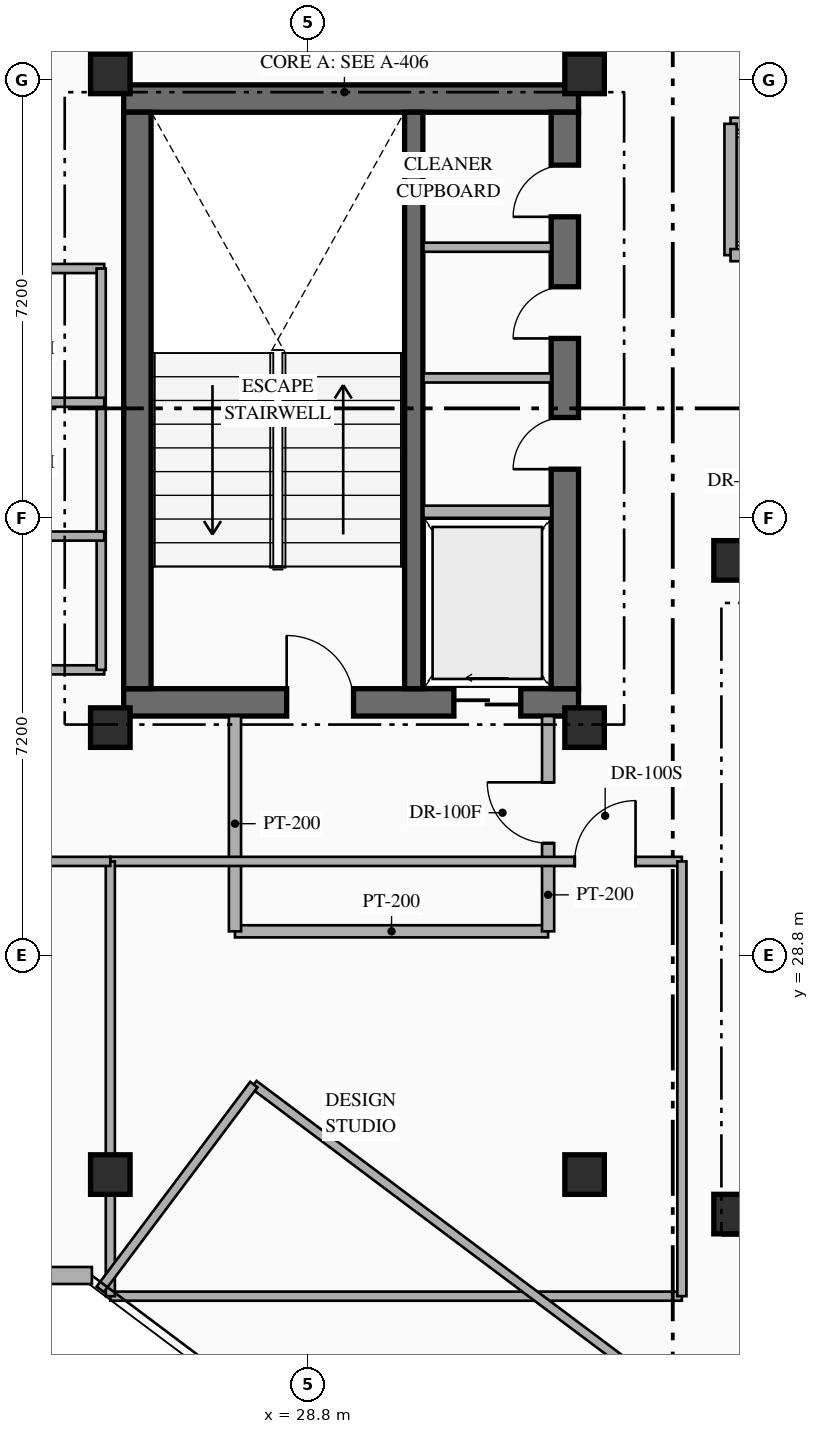
"""IFC4 building model, lengths in metres.
Left out: names, types, materials, properties, quantities, classifications, styles, units other than length and angle.
Written with IfcOpenShell. Run it as: python <this file> out.ifc"""

import sys

from ifc_helpers import new_model, si_unit, direction, frame, frame_2d, origin, origin_2d, place, context, subcontext, project, spatial, rectangle, hollow_rectangle, extrude, element, fill, save


model = new_model("IFC4")
c1 = context("Model", 3, precision=1e-05, world=origin(), true_north=direction((0.0, 1.0)))
c2 = subcontext(c1, "Body", "Model", "MODEL_VIEW")
j1 = project(units=[si_unit("LENGTHUNIT", "METRE"), si_unit("PLANEANGLEUNIT", "RADIAN")], contexts=[c1])
p1 = place(None, origin())
s1 = spatial("IfcSite", under=j1, at=p1, CompositionType="ELEMENT")
p2 = place(p1, origin())
s2 = spatial("IfcBuilding", under=s1, at=p2, CompositionType="ELEMENT")
p3 = place(p2, frame((0.0, 0.0, 239.55)))
s3 = spatial("IfcBuildingStorey", under=s2, at=p3, CompositionType="ELEMENT", Elevation=239.55)
p4 = place(p3, frame((25.77, 32.965, 0.0), z_axis=(0.0, 0.0, 1.0), x_axis=(1.0, 0.0, 0.0)))
e1 = element("IfcWall", 1, at=p4, inside=s3, PredefinedType="SHEAR", context=c2, shape_type="SweptSolid", body=[
    extrude(rectangle(XDim=7.48, YDim=0.45, at=frame_2d((3.74, 0.0))), origin(), (0.0, 0.0, 1.0), 3.6),
])
p5 = place(p4, frame((2.68, 0.0, 0.0)))
e2 = element("IfcOpeningElement", 2, at=p5, cuts=e1, PredefinedType="OPENING", context=c2, shape_type="SweptSolid", body=[
    extrude(rectangle(XDim=1.1, YDim=2.2, at=frame_2d((0.55, 1.1))), frame((0.0, 0.235, 0.0), z_axis=(0.0, -1.0, 0.0), x_axis=(1.0, 0.0, 0.0)), (0.0, 0.0, 1.0), 0.47),
])
p6 = place(p4, frame((5.43, 0.0, 0.0)))
e3 = element("IfcOpeningElement", 3, at=p6, cuts=e1, PredefinedType="OPENING", context=c2, shape_type="SweptSolid", body=[
    extrude(rectangle(XDim=1.1, YDim=2.15, at=frame_2d((0.55, 1.075))), frame((0.0, 0.235, 0.0), z_axis=(0.0, -1.0, 0.0), x_axis=(1.0, 0.0, 0.0)), (0.0, 0.0, 1.0), 0.47),
])
p7 = place(p3, frame((25.77, 42.895, 0.0), z_axis=(0.0, 0.0, 1.0), x_axis=(1.0, 0.0, 0.0)))
e4 = element("IfcWall", 4, at=p7, inside=s3, PredefinedType="SHEAR", context=c2, shape_type="SweptSolid", body=[
    extrude(rectangle(XDim=7.48, YDim=0.45, at=frame_2d((3.74, 0.0))), origin(), (0.0, 0.0, 1.0), 3.6),
])
p8 = place(p3, frame((25.995, 33.19, 0.0), z_axis=(0.0, 0.0, 1.0), x_axis=(0.0, 1.0, 0.0)))
e5 = element("IfcWall", 5, at=p8, inside=s3, PredefinedType="SHEAR", context=c2, shape_type="SweptSolid", body=[
    extrude(rectangle(XDim=9.48, YDim=0.45, at=frame_2d((4.74, 0.0))), origin(), (0.0, 0.0, 1.0), 3.6),
])
p9 = place(p3, frame((33.025, 33.19, 0.0), z_axis=(0.0, 0.0, 1.0), x_axis=(0.0, 1.0, 0.0)))
e6 = element("IfcWall", 6, at=p9, inside=s3, PredefinedType="SHEAR", context=c2, shape_type="SweptSolid", body=[
    extrude(rectangle(XDim=9.48, YDim=0.45, at=frame_2d((4.74, 0.0))), origin(), (0.0, 0.0, 1.0), 3.6),
])
p10 = place(p9, frame((3.61, 0.0, 0.0)))
e7 = element("IfcOpeningElement", 7, at=p10, cuts=e6, PredefinedType="OPENING", context=c2, shape_type="SweptSolid", body=[
    extrude(rectangle(XDim=0.85, YDim=2.08, at=frame_2d((0.425, 1.04))), frame((0.0, 0.235, 0.0), z_axis=(0.0, -1.0, 0.0), x_axis=(1.0, 0.0, 0.0)), (0.0, 0.0, 1.0), 0.47),
])
p11 = place(p9, frame((5.76, 0.0, 0.0)))
e8 = element("IfcOpeningElement", 8, at=p11, cuts=e6, PredefinedType="OPENING", context=c2, shape_type="SweptSolid", body=[
    extrude(rectangle(XDim=0.85, YDim=2.08, at=frame_2d((0.425, 1.04))), frame((0.0, 0.235, 0.0), z_axis=(0.0, -1.0, 0.0), x_axis=(1.0, 0.0, 0.0)), (0.0, 0.0, 1.0), 0.47),
])
p12 = place(p9, frame((7.76, 0.0, 0.0)))
e9 = element("IfcOpeningElement", 9, at=p12, cuts=e6, PredefinedType="OPENING", context=c2, shape_type="SweptSolid", body=[
    extrude(rectangle(XDim=0.85, YDim=2.08, at=frame_2d((0.425, 1.04))), frame((0.0, 0.235, 0.0), z_axis=(0.0, -1.0, 0.0), x_axis=(1.0, 0.0, 0.0)), (0.0, 0.0, 1.0), 0.47),
])
p13 = place(p3, frame((30.54, 33.19, 0.0), z_axis=(0.0, 0.0, 1.0), x_axis=(0.0, 1.0, 0.0)))
e10 = element("IfcWall", 10, at=p13, inside=s3, PredefinedType="SHEAR", context=c2, shape_type="SweptSolid", body=[
    extrude(rectangle(XDim=9.48, YDim=0.3, at=frame_2d((4.74, 0.0))), origin(), (0.0, 0.0, 1.0), 3.6),
])
for number, where, z_axis, x_axis in (
    (11, (25.55, 32.55, 0.0), (0.0, 0.0, 1.0), (1.0, 0.0, 0.0)),
    (12, (33.35, 32.55, 0.0), (0.0, 0.0, 1.0), (1.0, 0.0, 0.0)),
    (13, (25.55, 43.3, 0.0), (0.0, 0.0, 1.0), (1.0, 0.0, 0.0)),
    (14, (33.35, 43.3, 0.0), (0.0, 0.0, 1.0), (1.0, 0.0, 0.0)),
    (15, (35.8, 24.55, 0.0), (0.0, 0.0, 1.0), (1.0, 0.0, 0.0)),
    (16, (35.8, 35.3, 0.0), (0.0, 0.0, 1.0), (1.0, 0.0, 0.0)),
    (17, (25.55, 25.2, 0.0), (0.0, 0.0, 1.0), (1.0, 0.0, 0.0)),
    (18, (33.35, 25.2, 0.0), (0.0, 0.0, 1.0), (1.0, 0.0, 0.0)),
):
    element("IfcColumn", number, at=place(p3, frame(where, z_axis=z_axis, x_axis=x_axis)), inside=s3, PredefinedType="COLUMN", context=c2, shape_type="SweptSolid", body=[
        extrude(hollow_rectangle(XDim=0.65, YDim=0.65, WallThickness=0.025, at=origin_2d()), origin(), (0.0, 0.0, 1.0), 3.6),
    ])
p14 = place(p3, frame((25.247, 23.54, 0.0), z_axis=(0.0, 0.0, 1.0), x_axis=(-1.0, 0.0, 0.0)))
e19 = element("IfcWall", 19, at=p14, inside=s3, PredefinedType="STANDARD", context=c2, shape_type="SweptSolid", body=[
    extrude(rectangle(XDim=4.789, YDim=0.28, at=frame_2d((2.395, 0.0))), origin(), (0.0, 0.0, 1.0), 3.35),
])
p15 = place(p3, frame((30.7, 36.1, 0.0), z_axis=(0.0, 0.0, 1.0), x_axis=(1.0, 0.0, 0.0)))
e20 = element("IfcWall", 20, at=p15, inside=s3, PredefinedType="STANDARD", context=c2, shape_type="SweptSolid", body=[
    extrude(rectangle(XDim=2.1, YDim=0.2, at=frame_2d((1.05, 0.0))), origin(), (0.0, 0.0, 1.0), 3.35),
])
for number, where, z_axis, x_axis in (
    (21, (30.7, 38.3, 0.0), (0.0, 0.0, 1.0), (1.0, 0.0, 0.0)),
    (22, (30.7, 40.45, 0.0), (0.0, 0.0, 1.0), (1.0, 0.0, 0.0)),
):
    element("IfcWall", number, at=place(p3, frame(where, z_axis=z_axis, x_axis=x_axis)), inside=s3, PredefinedType="PARTITIONING", context=c2, shape_type="SweptSolid", body=[
        extrude(rectangle(XDim=2.1, YDim=0.15, at=frame_2d((1.05, 0.0))), origin(), (0.0, 0.0, 1.0), 3.35),
    ])
p16 = place(p3, frame((27.6, 29.2, 0.0), z_axis=(0.0, 0.0, 1.0), x_axis=(1.0, 0.0, 0.0)))
e23 = element("IfcWall", 23, at=p16, inside=s3, PredefinedType="STANDARD", context=c2, shape_type="SweptSolid", body=[
    extrude(rectangle(XDim=5.15, YDim=0.2, at=frame_2d((2.575, 0.0))), origin(), (0.0, 0.0, 1.0), 3.35),
])
p17 = place(p3, frame((27.6, 29.2, 0.0), z_axis=(0.0, 0.0, 1.0), x_axis=(0.0, 1.0, 0.0)))
e24 = element("IfcWall", 24, at=p17, inside=s3, PredefinedType="STANDARD", context=c2, shape_type="SweptSolid", body=[
    extrude(rectangle(XDim=3.54, YDim=0.2, at=frame_2d((1.77, 0.0))), origin(), (0.0, 0.0, 1.0), 3.35),
])
p18 = place(p3, frame((32.75, 29.2, 0.0), z_axis=(0.0, 0.0, 1.0), x_axis=(0.0, 1.0, 0.0)))
e25 = element("IfcWall", 25, at=p18, inside=s3, PredefinedType="STANDARD", context=c2, shape_type="SweptSolid", body=[
    extrude(rectangle(XDim=3.54, YDim=0.2, at=frame_2d((1.77, 0.0))), origin(), (0.0, 0.0, 1.0), 3.35),
])
p19 = place(p18, frame((1.45, 0.0, 0.0)))
e26 = element("IfcOpeningElement", 26, at=p19, cuts=e25, PredefinedType="OPENING", context=c2, shape_type="SweptSolid", body=[
    extrude(rectangle(XDim=1.0, YDim=2.2, at=frame_2d((0.5, 1.1))), frame((0.0, 0.11, 0.0), z_axis=(0.0, -1.0, 0.0), x_axis=(1.0, 0.0, 0.0)), (0.0, 0.0, 1.0), 0.22),
])
p20 = place(p3, frame((35.75, 42.48, 0.0), z_axis=(0.0, 0.0, 1.0), x_axis=(1.0, 0.0, 0.0)))
e27 = element("IfcWall", 27, at=p20, inside=s3, PredefinedType="STANDARD", context=c2, shape_type="SweptSolid", body=[
    extrude(rectangle(XDim=9.11, YDim=0.2, at=frame_2d((4.555, 0.0))), origin(), (0.0, 0.0, 1.0), 3.35),
])
p21 = place(p3, frame((35.75, 40.32, 0.0), z_axis=(0.0, 0.0, 1.0), x_axis=(0.0, 1.0, 0.0)))
e28 = element("IfcWall", 28, at=p21, inside=s3, PredefinedType="STANDARD", context=c2, shape_type="SweptSolid", body=[
    extrude(rectangle(XDim=2.16, YDim=0.2, at=frame_2d((1.08, 0.0))), origin(), (0.0, 0.0, 1.0), 3.35),
])
p22 = place(p3, frame((35.75, 40.32, 0.0), z_axis=(0.0, 0.0, 1.0), x_axis=(1.0, 0.0, 0.0)))
e29 = element("IfcWall", 29, at=p22, inside=s3, PredefinedType="STANDARD", context=c2, shape_type="SweptSolid", body=[
    extrude(rectangle(XDim=9.11, YDim=0.2, at=frame_2d((4.555, 0.0))), origin(), (0.0, 0.0, 1.0), 3.35),
])
p23 = place(p22, frame((0.53, 0.0, 0.0)))
e30 = element("IfcOpeningElement", 30, at=p23, cuts=e29, PredefinedType="OPENING", context=c2, shape_type="SweptSolid", body=[
    extrude(rectangle(XDim=1.1, YDim=2.18, at=frame_2d((0.55, 1.09))), frame((0.0, 0.11, 0.0), z_axis=(0.0, -1.0, 0.0), x_axis=(1.0, 0.0, 0.0)), (0.0, 0.0, 1.0), 0.22),
])
p24 = place(p22, frame((2.73, 0.0, 0.0)))
e31 = element("IfcOpeningElement", 31, at=p24, cuts=e29, PredefinedType="OPENING", context=c2, shape_type="SweptSolid", body=[
    extrude(rectangle(XDim=1.1, YDim=2.18, at=frame_2d((0.55, 1.09))), frame((0.0, 0.11, 0.0), z_axis=(0.0, -1.0, 0.0), x_axis=(1.0, 0.0, 0.0)), (0.0, 0.0, 1.0), 0.22),
])
p25 = place(p22, frame((4.93, 0.0, 0.0)))
e32 = element("IfcOpeningElement", 32, at=p25, cuts=e29, PredefinedType="OPENING", context=c2, shape_type="SweptSolid", body=[
    extrude(rectangle(XDim=1.1, YDim=2.18, at=frame_2d((0.55, 1.09))), frame((0.0, 0.11, 0.0), z_axis=(0.0, -1.0, 0.0), x_axis=(1.0, 0.0, 0.0)), (0.0, 0.0, 1.0), 0.22),
])
p26 = place(p22, frame((7.13, 0.0, 0.0)))
e33 = element("IfcOpeningElement", 33, at=p26, cuts=e29, PredefinedType="OPENING", context=c2, shape_type="SweptSolid", body=[
    extrude(rectangle(XDim=1.1, YDim=2.18, at=frame_2d((0.55, 1.09))), frame((0.0, 0.11, 0.0), z_axis=(0.0, -1.0, 0.0), x_axis=(1.0, 0.0, 0.0)), (0.0, 0.0, 1.0), 0.22),
])
for number, where, z_axis, x_axis in (
    (34, (22.15, 33.5, 0.0), (0.0, 0.0, 1.0), (1.0, 0.0, 0.0)),
    (35, (22.15, 40.1, 0.0), (0.0, 0.0, 1.0), (1.0, 0.0, 0.0)),
):
    element("IfcWall", number, at=place(p3, frame(where, z_axis=z_axis, x_axis=x_axis)), inside=s3, PredefinedType="PARTITIONING", context=c2, shape_type="SweptSolid", body=[
        extrude(rectangle(XDim=3.3, YDim=0.15, at=frame_2d((1.65, 0.0))), origin(), (0.0, 0.0, 1.0), 3.35),
    ])
p27 = place(p3, frame((25.4, 33.5, 0.0), z_axis=(0.0, 0.0, 1.0), x_axis=(0.0, 1.0, 0.0)))
e36 = element("IfcWall", 36, at=p27, inside=s3, PredefinedType="PARTITIONING", context=c2, shape_type="SweptSolid", body=[
    extrude(rectangle(XDim=6.6, YDim=0.15, at=frame_2d((3.3, 0.0))), origin(), (0.0, 0.0, 1.0), 3.35),
])
for number, where, z_axis, x_axis in (
    (37, (22.15, 35.7, 0.0), (0.0, 0.0, 1.0), (1.0, 0.0, 0.0)),
    (38, (22.15, 37.9, 0.0), (0.0, 0.0, 1.0), (1.0, 0.0, 0.0)),
):
    element("IfcWall", number, at=place(p3, frame(where, z_axis=z_axis, x_axis=x_axis)), inside=s3, PredefinedType="PARTITIONING", context=c2, shape_type="SweptSolid", body=[
        extrude(rectangle(XDim=3.3, YDim=0.15, at=frame_2d((1.65, 0.0))), origin(), (0.0, 0.0, 1.0), 3.35),
    ])
p28 = place(p3, frame((25.55, 23.2, 0.0), z_axis=(0.0, 0.0, 1.0), x_axis=(1.0, 0.0, 0.0)))
e39 = element("IfcWall", 39, at=p28, inside=s3, PredefinedType="PARTITIONING", context=c2, shape_type="SweptSolid", body=[
    extrude(rectangle(XDim=9.4, YDim=0.15, at=frame_2d((4.7, 0.0))), origin(), (0.0, 0.0, 1.0), 3.35),
])
p29 = place(p3, frame((25.55, 30.35, 0.0), z_axis=(0.0, 0.0, 1.0), x_axis=(1.0, 0.0, 0.0)))
e40 = element("IfcWall", 40, at=p29, inside=s3, PredefinedType="PARTITIONING", context=c2, shape_type="SweptSolid", body=[
    extrude(rectangle(XDim=9.4, YDim=0.15, at=frame_2d((4.7, 0.0))), origin(), (0.0, 0.0, 1.0), 3.35),
])
p30 = place(p29, frame((7.638, 0.0, 0.0)))
e41 = element("IfcOpeningElement", 41, at=p30, cuts=e40, PredefinedType="OPENING", context=c2, shape_type="SweptSolid", body=[
    extrude(rectangle(XDim=1.0, YDim=2.15, at=frame_2d((0.5, 1.075))), frame((0.0, 0.085, 0.0), z_axis=(0.0, -1.0, 0.0), x_axis=(1.0, 0.0, 0.0)), (0.0, 0.0, 1.0), 0.17),
])
p31 = place(p3, frame((25.55, 23.2, 0.0), z_axis=(0.0, 0.0, 1.0), x_axis=(0.0, 1.0, 0.0)))
e42 = element("IfcWall", 42, at=p31, inside=s3, PredefinedType="PARTITIONING", context=c2, shape_type="SweptSolid", body=[
    extrude(rectangle(XDim=7.15, YDim=0.15, at=frame_2d((3.575, 0.0))), origin(), (0.0, 0.0, 1.0), 2.757),
])
p32 = place(p3, frame((34.95, 23.2, 0.0), z_axis=(0.0, 0.0, 1.0), x_axis=(0.0, 1.0, 0.0)))
e43 = element("IfcWall", 43, at=p32, inside=s3, PredefinedType="PARTITIONING", context=c2, shape_type="SweptSolid", body=[
    extrude(rectangle(XDim=7.15, YDim=0.15, at=frame_2d((3.575, 0.0))), origin(), (0.0, 0.0, 1.0), 3.35),
])
p33 = place(p3, frame((22.25, 30.35, 0.0), z_axis=(0.0, 0.0, 1.0), x_axis=(1.0, 0.0, 0.0)))
e44 = element("IfcWall", 44, at=p33, inside=s3, PredefinedType="PARTITIONING", context=c2, shape_type="SweptSolid", body=[
    extrude(rectangle(XDim=3.3, YDim=0.15, at=frame_2d((1.65, 0.0))), origin(), (0.0, 0.0, 1.0), 3.35),
])
p34 = place(p33, frame((1.175, 0.0, 0.0)))
e45 = element("IfcOpeningElement", 45, at=p34, cuts=e44, PredefinedType="OPENING", context=c2, shape_type="SweptSolid", body=[
    extrude(rectangle(XDim=0.95, YDim=2.15, at=frame_2d((0.475, 1.075))), frame((0.0, 0.085, 0.0), z_axis=(0.0, -1.0, 0.0), x_axis=(1.0, 0.0, 0.0)), (0.0, 0.0, 1.0), 0.17),
])
p35 = place(p3, frame((27.91, 26.68, 0.0), z_axis=(0.0, 0.0, 1.0), x_axis=(0.8, -0.6, 0.0)))
e46 = element("IfcWall", 46, at=p35, inside=s3, PredefinedType="PARTITIONING", context=c2, shape_type="SweptSolid", body=[
    extrude(rectangle(XDim=17.76, YDim=0.15, at=frame_2d((8.88, 0.0))), origin(), (0.0, 0.0, 1.0), 3.35),
])
p36 = place(p35, frame((11.294, 0.0, 0.0)))
e47 = element("IfcOpeningElement", 47, at=p36, cuts=e46, PredefinedType="OPENING", context=c2, shape_type="SweptSolid", body=[
    extrude(rectangle(XDim=0.95, YDim=2.15, at=frame_2d((0.475, 1.075))), frame((0.0, 0.085, 0.0), z_axis=(0.0, -1.0, 0.0), x_axis=(1.0, 0.0, 0.0)), (0.0, 0.0, 1.0), 0.17),
])
p37 = place(p3, frame((25.384, 23.312, 0.0), z_axis=(0.0, 0.0, 1.0), x_axis=(0.599990721155, 0.80000695905, 0.0)))
e48 = element("IfcWall", 48, at=p37, inside=s3, PredefinedType="PARTITIONING", context=c2, shape_type="SweptSolid", body=[
    extrude(rectangle(XDim=4.21, YDim=0.15, at=frame_2d((2.105, 0.0))), origin(), (0.0, 0.0, 1.0), 3.35),
])
p38 = place(p5, origin())
e49 = element("IfcDoor", 49, at=p38, inside=s3, OperationType="SINGLE_SWING_LEFT", PredefinedType="DOOR", context=c2, shape_type="SweptSolid", body=[
    extrude(rectangle(XDim=1.1, YDim=2.2, at=frame_2d((0.55, 1.1))), frame((0.0, 0.025, 0.0), z_axis=(0.0, -1.0, 0.0), x_axis=(1.0, 0.0, 0.0)), (0.0, 0.0, 1.0), 0.05),
])
fill(e2, e49)
p39 = place(p6, origin())
e50 = element("IfcDoor", 50, at=p39, inside=s3, OperationType="SLIDING_TO_LEFT", PredefinedType="USERDEFINED", context=c2, shape_type="SweptSolid", body=[
    extrude(rectangle(XDim=1.1, YDim=2.15, at=frame_2d((0.55, 1.075))), frame((0.0, 0.025, 0.0), z_axis=(0.0, -1.0, 0.0), x_axis=(1.0, 0.0, 0.0)), (0.0, 0.0, 1.0), 0.05),
])
fill(e3, e50)
p40 = place(p10, origin())
e51 = element("IfcDoor", 51, at=p40, inside=s3, OperationType="SINGLE_SWING_LEFT", PredefinedType="DOOR", context=c2, shape_type="SweptSolid", body=[
    extrude(rectangle(XDim=0.85, YDim=2.08, at=frame_2d((0.425, 1.04))), frame((0.0, 0.025, 0.0), z_axis=(0.0, -1.0, 0.0), x_axis=(1.0, 0.0, 0.0)), (0.0, 0.0, 1.0), 0.05),
])
fill(e7, e51)
p41 = place(p11, origin())
e52 = element("IfcDoor", 52, at=p41, inside=s3, OperationType="SINGLE_SWING_LEFT", PredefinedType="DOOR", context=c2, shape_type="SweptSolid", body=[
    extrude(rectangle(XDim=0.85, YDim=2.08, at=frame_2d((0.425, 1.04))), frame((0.0, 0.025, 0.0), z_axis=(0.0, -1.0, 0.0), x_axis=(1.0, 0.0, 0.0)), (0.0, 0.0, 1.0), 0.05),
])
fill(e8, e52)
p42 = place(p12, origin())
e53 = element("IfcDoor", 53, at=p42, inside=s3, OperationType="SINGLE_SWING_LEFT", PredefinedType="DOOR", context=c2, shape_type="SweptSolid", body=[
    extrude(rectangle(XDim=0.85, YDim=2.08, at=frame_2d((0.425, 1.04))), frame((0.0, 0.025, 0.0), z_axis=(0.0, -1.0, 0.0), x_axis=(1.0, 0.0, 0.0)), (0.0, 0.0, 1.0), 0.05),
])
fill(e9, e53)
p43 = place(p19, origin())
e54 = element("IfcDoor", 54, at=p43, inside=s3, OperationType="SINGLE_SWING_RIGHT", PredefinedType="DOOR", context=c2, shape_type="SweptSolid", body=[
    extrude(rectangle(XDim=1.0, YDim=2.2, at=frame_2d((0.5, 1.1))), frame((0.0, 0.025, 0.0), z_axis=(0.0, -1.0, 0.0), x_axis=(1.0, 0.0, 0.0)), (0.0, 0.0, 1.0), 0.05),
])
fill(e26, e54)
p44 = place(p30, origin())
e55 = element("IfcDoor", 55, at=p44, inside=s3, OperationType="SINGLE_SWING_RIGHT", PredefinedType="DOOR", context=c2, shape_type="SweptSolid", body=[
    extrude(rectangle(XDim=1.0, YDim=2.15, at=frame_2d((0.5, 1.075))), frame((0.0, 0.025, 0.0), z_axis=(0.0, -1.0, 0.0), x_axis=(1.0, 0.0, 0.0)), (0.0, 0.0, 1.0), 0.05),
])
fill(e41, e55)
save(model, sys.argv[1])
